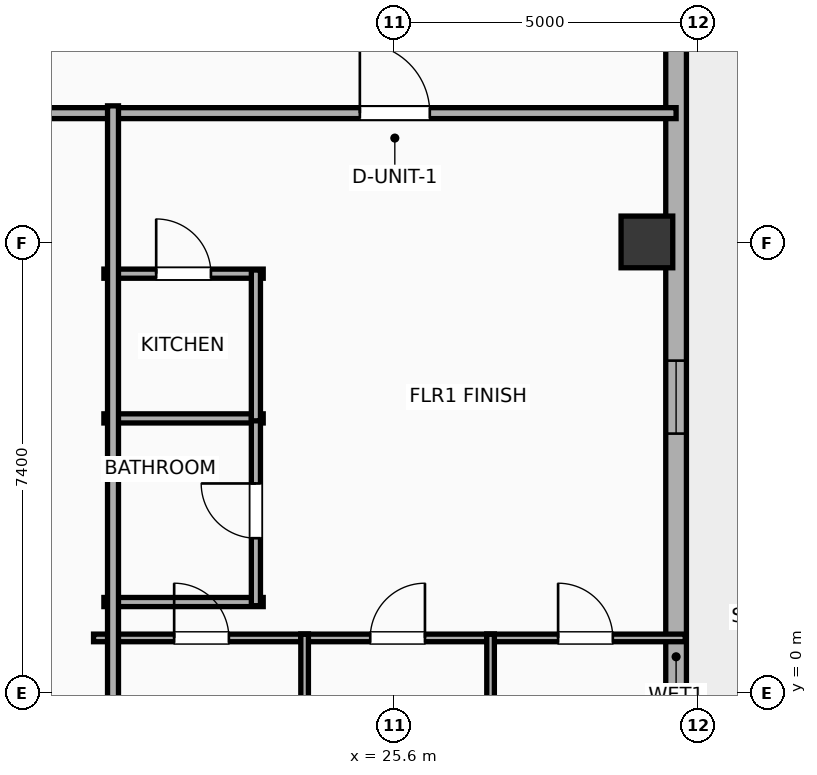
"""IFC4 building model, lengths in metres.
Left out: names, types, materials, properties, quantities, classifications, styles, units other than length and angle.
Written with IfcOpenShell. Run it as: python <this file> out.ifc"""

import sys

from ifc_helpers import new_model, si_unit, direction, frame, frame_2d, origin, origin_2d, place, context, subcontext, project, spatial, rectangle, hollow_rectangle, extrude, element, fill, save


model = new_model("IFC4")
c1 = context("Model", 3, precision=1e-05, world=origin(), true_north=direction((0.0, 1.0)))
c2 = subcontext(c1, "Body", "Model", "MODEL_VIEW")
j1 = project(units=[si_unit("LENGTHUNIT", "METRE"), si_unit("PLANEANGLEUNIT", "RADIAN")], contexts=[c1])
p1 = place(None, origin())
s1 = spatial("IfcSite", under=j1, at=p1, CompositionType="ELEMENT")
p2 = place(p1, origin())
s2 = spatial("IfcBuilding", under=s1, at=p2, CompositionType="ELEMENT")
p3 = place(p2, frame((0.0, 0.0, 231.4)))
s3 = spatial("IfcBuildingStorey", under=s2, at=p3, CompositionType="ELEMENT", Elevation=231.4)
p4 = place(p3, frame((29.75, 7.422, 0.0), z_axis=(0.0, 0.0, 1.0), x_axis=(1.0, 0.0, 0.0)))
e1 = element("IfcColumn", 1, at=p4, inside=s3, PredefinedType="COLUMN", context=c2, shape_type="SweptSolid", body=[
    extrude(hollow_rectangle(XDim=0.85, YDim=0.85, WallThickness=0.028, at=origin_2d()), origin(), (0.0, 0.0, 1.0), 3.9),
])
p5 = place(p3, frame((30.23, 16.583, 0.0), z_axis=(0.0, 0.0, 1.0), x_axis=(0.0, -1.0, 0.0)))
e2 = element("IfcWall", 2, at=p5, inside=s3, PredefinedType="ELEMENTEDWALL", context=c2, shape_type="SweptSolid", body=[
    extrude(rectangle(XDim=31.967, YDim=0.34, at=frame_2d((15.983, 0.0))), origin(), (0.0, 0.0, 1.0), 3.65),
])
p6 = place(p5, frame((23.925, 0.0, 0.75)))
e3 = element("IfcOpeningElement", 3, at=p6, cuts=e2, PredefinedType="OPENING", context=c2, shape_type="SweptSolid", body=[
    extrude(rectangle(XDim=1.8, YDim=2.1, at=frame_2d((0.9, 1.05))), frame((0.0, 0.18, 0.0), z_axis=(0.0, -1.0, 0.0), x_axis=(1.0, 0.0, 0.0)), (0.0, 0.0, 1.0), 0.36),
])
p7 = place(p5, frame((30.402, 0.0, 0.75)))
e4 = element("IfcOpeningElement", 4, at=p7, cuts=e2, PredefinedType="OPENING", context=c2, shape_type="SweptSolid", body=[
    extrude(rectangle(XDim=1.2, YDim=2.05, at=frame_2d((0.6, 1.025))), frame((0.0, 0.18, 0.0), z_axis=(0.0, -1.0, 0.0), x_axis=(1.0, 0.0, 0.0)), (0.0, 0.0, 1.0), 0.36),
])
p8 = place(p5, frame((11.113, 0.0, 0.75)))
e5 = element("IfcOpeningElement", 5, at=p8, cuts=e2, PredefinedType="OPENING", context=c2, shape_type="SweptSolid", body=[
    extrude(rectangle(XDim=1.2, YDim=2.05, at=frame_2d((0.6, 1.025))), frame((0.0, 0.18, 0.0), z_axis=(0.0, -1.0, 0.0), x_axis=(1.0, 0.0, 0.0)), (0.0, 0.0, 1.0), 0.36),
])
p9 = place(p3, frame((9.88, 9.54, 0.0), z_axis=(0.0, 0.0, 1.0), x_axis=(1.0, 0.0, 0.0)))
e6 = element("IfcWall", 6, at=p9, inside=s3, PredefinedType="PARTITIONING", context=c2, shape_type="SweptSolid", body=[
    extrude(rectangle(XDim=20.35, YDim=0.18, at=frame_2d((10.175, 0.0))), origin(), (0.0, 0.0, 1.0), 3.65),
])
p10 = place(p9, frame((15.149, 0.0, 0.0)))
e7 = element("IfcOpeningElement", 7, at=p10, cuts=e6, PredefinedType="OPENING", context=c2, shape_type="SweptSolid", body=[
    extrude(rectangle(XDim=1.15, YDim=2.05, at=frame_2d((0.575, 1.025))), frame((0.0, 0.1, 0.0), z_axis=(0.0, -1.0, 0.0), x_axis=(1.0, 0.0, 0.0)), (0.0, 0.0, 1.0), 0.2),
])
p11 = place(p3, frame((20.82, 6.9, 0.0), z_axis=(0.0, 0.0, 1.0), x_axis=(1.0, 0.0, 0.0)))
e8 = element("IfcWall", 8, at=p11, inside=s3, PredefinedType="PLUMBINGWALL", context=c2, shape_type="SweptSolid", body=[
    extrude(rectangle(XDim=2.62, YDim=0.15, at=frame_2d((1.31, 0.0))), origin(), (0.0, 0.0, 1.0), 3.65),
])
p12 = place(p11, frame((0.86, 0.0, 0.0)))
e9 = element("IfcOpeningElement", 9, at=p12, cuts=e8, PredefinedType="OPENING", context=c2, shape_type="SweptSolid", body=[
    extrude(rectangle(XDim=0.9, YDim=2.05, at=frame_2d((0.45, 1.025))), frame((0.0, 0.085, 0.0), z_axis=(0.0, -1.0, 0.0), x_axis=(1.0, 0.0, 0.0)), (0.0, 0.0, 1.0), 0.17),
])
for number, where, z_axis, x_axis in (
    (10, (20.82, 4.52, 0.0), (0.0, 0.0, 1.0), (1.0, 0.0, 0.0)),
    (11, (20.82, 1.5, 0.0), (0.0, 0.0, 1.0), (1.0, 0.0, 0.0)),
):
    element("IfcWall", number, at=place(p3, frame(where, z_axis=z_axis, x_axis=x_axis)), inside=s3, PredefinedType="PLUMBINGWALL", context=c2, shape_type="SweptSolid", body=[
        extrude(rectangle(XDim=2.62, YDim=0.15, at=frame_2d((1.31, 0.0))), origin(), (0.0, 0.0, 1.0), 3.65),
    ])
p13 = place(p3, frame((23.32, 1.44, 0.0), z_axis=(0.0, 0.0, 1.0), x_axis=(0.0, 1.0, 0.0)))
e12 = element("IfcWall", 12, at=p13, inside=s3, PredefinedType="PLUMBINGWALL", context=c2, shape_type="SweptSolid", body=[
    extrude(rectangle(XDim=3.12, YDim=0.15, at=frame_2d((1.56, 0.0))), origin(), (0.0, 0.0, 1.0), 3.65),
])
p14 = place(p13, frame((1.11, 0.0, 0.0)))
e13 = element("IfcOpeningElement", 13, at=p14, cuts=e12, PredefinedType="OPENING", context=c2, shape_type="SweptSolid", body=[
    extrude(rectangle(XDim=0.9, YDim=2.05, at=frame_2d((0.45, 1.025))), frame((0.0, 0.085, 0.0), z_axis=(0.0, -1.0, 0.0), x_axis=(1.0, 0.0, 0.0)), (0.0, 0.0, 1.0), 0.17),
])
p15 = place(p3, frame((23.32, 4.48, 0.0), z_axis=(0.0, 0.0, 1.0), x_axis=(0.0, 1.0, 0.0)))
e14 = element("IfcWall", 14, at=p15, inside=s3, PredefinedType="PLUMBINGWALL", context=c2, shape_type="SweptSolid", body=[
    extrude(rectangle(XDim=2.48, YDim=0.15, at=frame_2d((1.24, 0.0))), origin(), (0.0, 0.0, 1.0), 3.65),
])
p16 = place(p3, frame((20.65, 0.91, 0.0), z_axis=(0.0, 0.0, 1.0), x_axis=(1.0, 0.0, 0.0)))
e15 = element("IfcWall", 15, at=p16, inside=s3, PredefinedType="PARTITIONING", context=c2, shape_type="SweptSolid", body=[
    extrude(rectangle(XDim=3.534, YDim=0.125, at=frame_2d((1.767, 0.0))), origin(), (0.0, 0.0, 1.0), 3.65),
])
p17 = place(p16, frame((1.325, 0.0, 0.0)))
e16 = element("IfcOpeningElement", 16, at=p17, cuts=e15, PredefinedType="OPENING", context=c2, shape_type="SweptSolid", body=[
    extrude(rectangle(XDim=0.9, YDim=2.05, at=frame_2d((0.45, 1.025))), frame((0.0, 0.073, 0.0), z_axis=(0.0, -1.0, 0.0), x_axis=(1.0, 0.0, 0.0)), (0.0, 0.0, 1.0), 0.145),
])
p18 = place(p3, frame((24.059, 0.91, 0.0), z_axis=(0.0, 0.0, 1.0), x_axis=(1.0, 0.0, 0.0)))
e17 = element("IfcWall", 17, at=p18, inside=s3, PredefinedType="PARTITIONING", context=c2, shape_type="SweptSolid", body=[
    extrude(rectangle(XDim=3.183, YDim=0.125, at=frame_2d((1.591, 0.0))), origin(), (0.0, 0.0, 1.0), 3.65),
])
p19 = place(p18, frame((1.142, 0.0, 0.0)))
e18 = element("IfcOpeningElement", 18, at=p19, cuts=e17, PredefinedType="OPENING", context=c2, shape_type="SweptSolid", body=[
    extrude(rectangle(XDim=0.9, YDim=2.05, at=frame_2d((0.45, 1.025))), frame((0.0, 0.073, 0.0), z_axis=(0.0, -1.0, 0.0), x_axis=(1.0, 0.0, 0.0)), (0.0, 0.0, 1.0), 0.145),
])
p20 = place(p3, frame((27.116, 0.91, 0.0), z_axis=(0.0, 0.0, 1.0), x_axis=(1.0, 0.0, 0.0)))
e19 = element("IfcWall", 19, at=p20, inside=s3, PredefinedType="PARTITIONING", context=c2, shape_type="SweptSolid", body=[
    extrude(rectangle(XDim=3.263, YDim=0.125, at=frame_2d((1.632, 0.0))), origin(), (0.0, 0.0, 1.0), 3.65),
])
p21 = place(p20, frame((1.173, 0.0, 0.0)))
e20 = element("IfcOpeningElement", 20, at=p21, cuts=e19, PredefinedType="OPENING", context=c2, shape_type="SweptSolid", body=[
    extrude(rectangle(XDim=0.9, YDim=2.05, at=frame_2d((0.45, 1.025))), frame((0.0, 0.073, 0.0), z_axis=(0.0, -1.0, 0.0), x_axis=(1.0, 0.0, 0.0)), (0.0, 0.0, 1.0), 0.145),
])
for number, where, z_axis, x_axis in (
    (21, (27.179, -9.86, 0.0), (0.0, 0.0, 1.0), (0.0, 1.0, 0.0)),
    (22, (24.121, -9.86, 0.0), (0.0, 0.0, 1.0), (0.0, 1.0, 0.0)),
):
    element("IfcWall", number, at=place(p3, frame(where, z_axis=z_axis, x_axis=x_axis)), inside=s3, PredefinedType="PARTITIONING", context=c2, shape_type="SweptSolid", body=[
        extrude(rectangle(XDim=10.83, YDim=0.125, at=frame_2d((5.415, 0.0))), origin(), (0.0, 0.0, 1.0), 3.65),
    ])
p22 = place(p3, frame((20.97, -9.66, 0.0), z_axis=(0.0, 0.0, 1.0), x_axis=(0.0, 1.0, 0.0)))
e23 = element("IfcWall", 23, at=p22, inside=s3, PredefinedType="PARTITIONING", context=c2, shape_type="SweptSolid", body=[
    extrude(rectangle(XDim=19.32, YDim=0.18, at=frame_2d((9.66, 0.0))), origin(), (0.0, 0.0, 1.0), 3.65),
])
p23 = place(p8, origin())
e24 = element("IfcWindow", 24, at=p23, inside=s3, PartitioningType="SINGLE_PANEL", PredefinedType="WINDOW", context=c2, shape_type="SweptSolid", body=[
    extrude(rectangle(XDim=1.2, YDim=2.05, at=frame_2d((0.6, 1.025))), frame((0.0, 0.03, 0.0), z_axis=(0.0, -1.0, 0.0), x_axis=(1.0, 0.0, 0.0)), (0.0, 0.0, 1.0), 0.06),
])
fill(e5, e24)
p24 = place(p10, origin())
e25 = element("IfcDoor", 25, at=p24, inside=s3, OperationType="SINGLE_SWING_LEFT", PredefinedType="DOOR", context=c2, shape_type="SweptSolid", body=[
    extrude(rectangle(XDim=1.15, YDim=2.05, at=frame_2d((0.575, 1.025))), frame((0.0, 0.025, 0.0), z_axis=(0.0, -1.0, 0.0), x_axis=(1.0, 0.0, 0.0)), (0.0, 0.0, 1.0), 0.05),
])
fill(e7, e25)
p25 = place(p12, origin())
e26 = element("IfcDoor", 26, at=p25, inside=s3, OperationType="SINGLE_SWING_LEFT", PredefinedType="DOOR", context=c2, shape_type="SweptSolid", body=[
    extrude(rectangle(XDim=0.9, YDim=2.05, at=frame_2d((0.45, 1.025))), frame((0.0, 0.025, 0.0), z_axis=(0.0, -1.0, 0.0), x_axis=(1.0, 0.0, 0.0)), (0.0, 0.0, 1.0), 0.05),
])
fill(e9, e26)
p26 = place(p14, origin())
e27 = element("IfcDoor", 27, at=p26, inside=s3, OperationType="SINGLE_SWING_RIGHT", PredefinedType="DOOR", context=c2, shape_type="SweptSolid", body=[
    extrude(rectangle(XDim=0.9, YDim=2.05, at=frame_2d((0.45, 1.025))), frame((0.0, 0.025, 0.0), z_axis=(0.0, -1.0, 0.0), x_axis=(1.0, 0.0, 0.0)), (0.0, 0.0, 1.0), 0.05),
])
fill(e13, e27)
p27 = place(p17, origin())
e28 = element("IfcDoor", 28, at=p27, inside=s3, OperationType="SINGLE_SWING_LEFT", PredefinedType="DOOR", context=c2, shape_type="SweptSolid", body=[
    extrude(rectangle(XDim=0.9, YDim=2.05, at=frame_2d((0.45, 1.025))), frame((0.0, 0.025, 0.0), z_axis=(0.0, -1.0, 0.0), x_axis=(1.0, 0.0, 0.0)), (0.0, 0.0, 1.0), 0.05),
])
fill(e16, e28)
p28 = place(p19, origin())
e29 = element("IfcDoor", 29, at=p28, inside=s3, OperationType="SINGLE_SWING_RIGHT", PredefinedType="DOOR", context=c2, shape_type="SweptSolid", body=[
    extrude(rectangle(XDim=0.9, YDim=2.05, at=frame_2d((0.45, 1.025))), frame((0.0, 0.025, 0.0), z_axis=(0.0, -1.0, 0.0), x_axis=(1.0, 0.0, 0.0)), (0.0, 0.0, 1.0), 0.05),
])
fill(e18, e29)
p29 = place(p21, origin())
e30 = element("IfcDoor", 30, at=p29, inside=s3, OperationType="SINGLE_SWING_LEFT", PredefinedType="DOOR", context=c2, shape_type="SweptSolid", body=[
    extrude(rectangle(XDim=0.9, YDim=2.05, at=frame_2d((0.45, 1.025))), frame((0.0, 0.025, 0.0), z_axis=(0.0, -1.0, 0.0), x_axis=(1.0, 0.0, 0.0)), (0.0, 0.0, 1.0), 0.05),
])
fill(e20, e30)
save(model, sys.argv[1])
